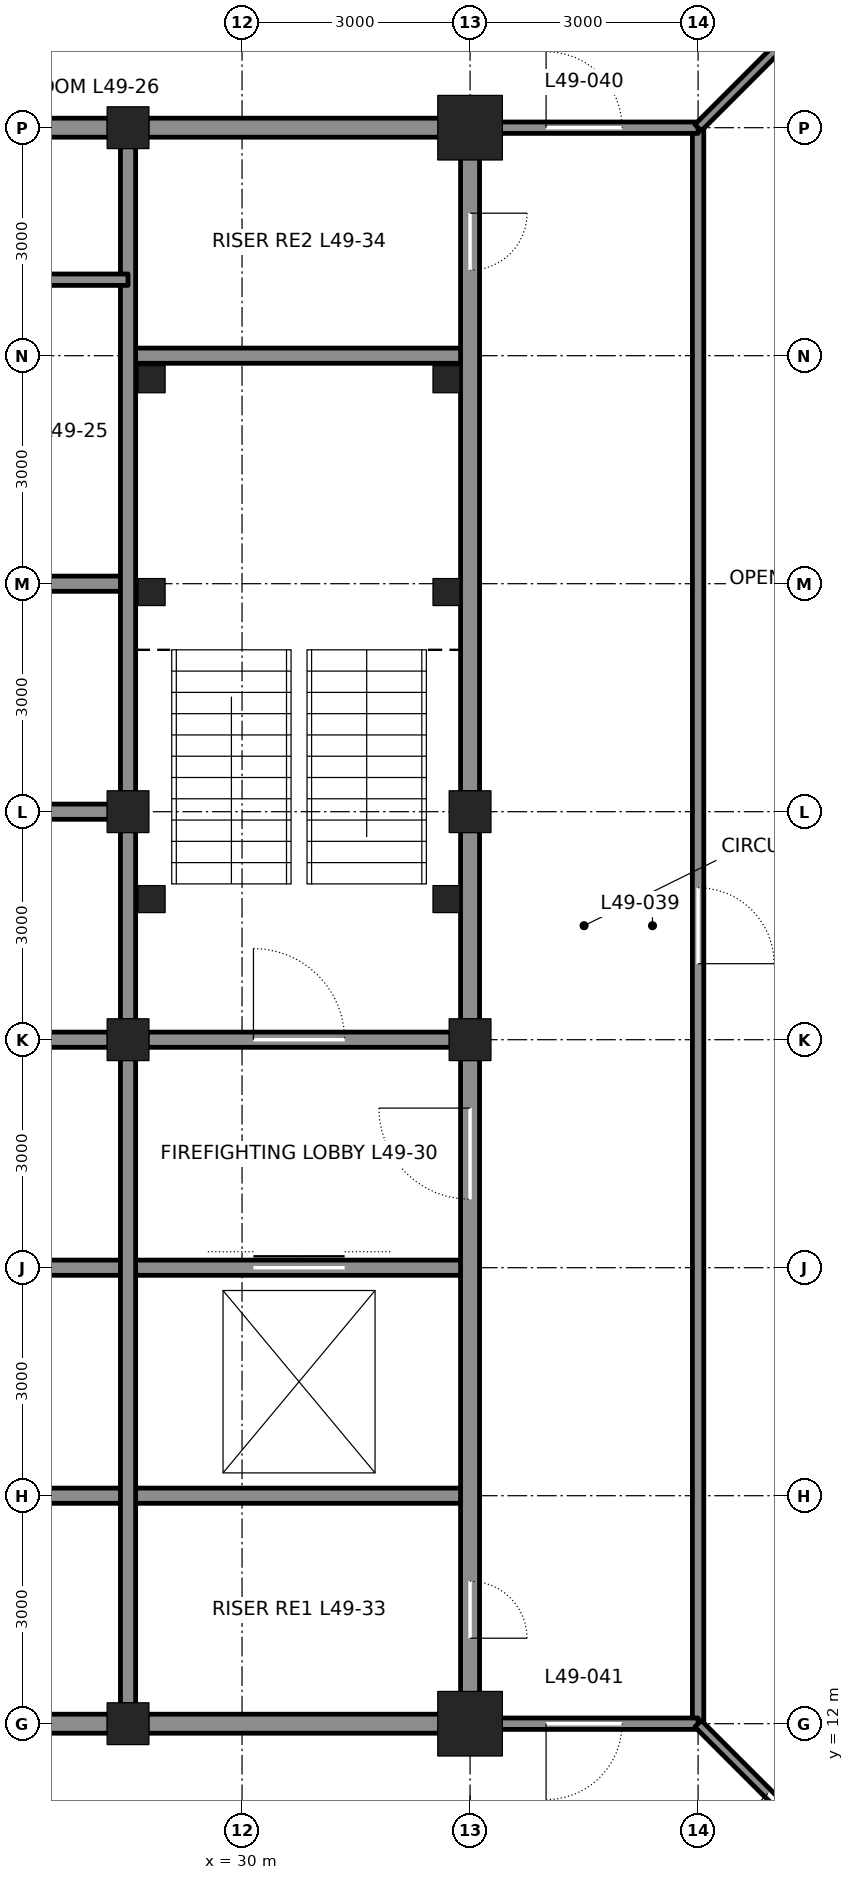
"""IFC4 building model, lengths in metres.
Left out: names, types, materials, properties, quantities, classifications, styles, units other than length and angle.
Written with IfcOpenShell. Run it as: python <this file> out.ifc"""

import sys

from ifc_helpers import new_model, si_unit, direction, frame, frame_2d, origin, origin_2d, place, context, subcontext, project, spatial, rectangle, hollow_rectangle, extrude, element, fill, save


model = new_model("IFC4")
c1 = context("Model", 3, precision=1e-05, world=origin(), true_north=direction((0.0, 1.0)))
c2 = subcontext(c1, "Body", "Model", "MODEL_VIEW")
j1 = project(units=[si_unit("LENGTHUNIT", "METRE"), si_unit("PLANEANGLEUNIT", "RADIAN")], contexts=[c1])
p1 = place(None, origin())
s1 = spatial("IfcSite", under=j1, at=p1, CompositionType="ELEMENT")
p2 = place(p1, origin())
s2 = spatial("IfcBuilding", under=s1, at=p2, CompositionType="ELEMENT")
p3 = place(p2, frame((0.0, 0.0, 222.3)))
s3 = spatial("IfcBuildingStorey", under=s2, at=p3, CompositionType="ELEMENT", Elevation=222.3)
p4 = place(p3, frame((28.5, 12.0, 0.0), z_axis=(0.0, 0.0, 1.0), x_axis=(1.0, 0.0, 0.0)))
e1 = element("IfcColumn", 1, at=p4, inside=s3, PredefinedType="COLUMN", context=c2, shape_type="SweptSolid", body=[
    extrude(hollow_rectangle(XDim=0.55, YDim=0.55, WallThickness=0.045, at=origin_2d()), origin(), (0.0, 0.0, 1.0), 4.2),
])
p5 = place(p3, frame((33.0, 12.0, 0.0), z_axis=(0.0, 0.0, 1.0), x_axis=(1.0, 0.0, 0.0)))
e2 = element("IfcColumn", 2, at=p5, inside=s3, PredefinedType="COLUMN", context=c2, shape_type="SweptSolid", body=[
    extrude(hollow_rectangle(XDim=0.85, YDim=0.85, WallThickness=0.085, at=origin_2d()), origin(), (0.0, 0.0, 1.0), 4.2),
])
p6 = place(p3, frame((28.5, 33.0, 0.0), z_axis=(0.0, 0.0, 1.0), x_axis=(1.0, 0.0, 0.0)))
e3 = element("IfcColumn", 3, at=p6, inside=s3, PredefinedType="COLUMN", context=c2, shape_type="SweptSolid", body=[
    extrude(hollow_rectangle(XDim=0.55, YDim=0.55, WallThickness=0.045, at=origin_2d()), origin(), (0.0, 0.0, 1.0), 4.2),
])
p7 = place(p3, frame((33.0, 33.0, 0.0), z_axis=(0.0, 0.0, 1.0), x_axis=(1.0, 0.0, 0.0)))
e4 = element("IfcColumn", 4, at=p7, inside=s3, PredefinedType="COLUMN", context=c2, shape_type="SweptSolid", body=[
    extrude(hollow_rectangle(XDim=0.85, YDim=0.85, WallThickness=0.085, at=origin_2d()), origin(), (0.0, 0.0, 1.0), 4.2),
])
for number, where, z_axis, x_axis in (
    (5, (33.0, 21.0, 0.0), (0.0, 0.0, 1.0), (1.0, 0.0, 0.0)),
    (6, (33.0, 24.0, 0.0), (0.0, 0.0, 1.0), (1.0, 0.0, 0.0)),
    (7, (28.5, 21.0, 0.0), (0.0, 0.0, 1.0), (1.0, 0.0, 0.0)),
    (8, (28.5, 24.0, 0.0), (0.0, 0.0, 1.0), (1.0, 0.0, 0.0)),
):
    element("IfcColumn", number, at=place(p3, frame(where, z_axis=z_axis, x_axis=x_axis)), inside=s3, PredefinedType="COLUMN", context=c2, shape_type="SweptSolid", body=[
        extrude(hollow_rectangle(XDim=0.55, YDim=0.55, WallThickness=0.045, at=origin_2d()), origin(), (0.0, 0.0, 1.0), 4.2),
    ])
p8 = place(p3, frame((25.75, 12.0, 0.0), z_axis=(0.0, 0.0, 1.0), x_axis=(1.0, 0.0, 0.0)))
e9 = element("IfcWall", 9, at=p8, inside=s3, PredefinedType="SOLIDWALL", context=c2, shape_type="SweptSolid", body=[
    extrude(rectangle(XDim=2.5, YDim=0.25, at=frame_2d((1.25, 0.0))), origin(), (0.0, 0.0, 1.0), 3.181),
])
p9 = place(p3, frame((28.75, 12.0, 0.0), z_axis=(0.0, 0.0, 1.0), x_axis=(1.0, 0.0, 0.0)))
e10 = element("IfcWall", 10, at=p9, inside=s3, PredefinedType="SOLIDWALL", context=c2, shape_type="SweptSolid", body=[
    extrude(rectangle(XDim=4.0, YDim=0.25, at=frame_2d((2.0, 0.0))), origin(), (0.0, 0.0, 1.0), 3.181),
])
p10 = place(p3, frame((25.5, 15.0, 0.0), z_axis=(0.0, 0.0, 1.0), x_axis=(1.0, 0.0, 0.0)))
e11 = element("IfcWall", 11, at=p10, inside=s3, PredefinedType="SOLIDWALL", context=c2, shape_type="SweptSolid", body=[
    extrude(rectangle(XDim=7.5, YDim=0.2, at=frame_2d((3.75, 0.0))), origin(), (0.0, 0.0, 1.0), 4.04),
])
p11 = place(p3, frame((25.5, 24.0, 0.0), z_axis=(0.0, 0.0, 1.0), x_axis=(1.0, 0.0, 0.0)))
e12 = element("IfcWall", 12, at=p11, inside=s3, PredefinedType="SOLIDWALL", context=c2, shape_type="SweptSolid", body=[
    extrude(rectangle(XDim=2.75, YDim=0.2, at=frame_2d((1.375, 0.0))), origin(), (0.0, 0.0, 1.0), 3.09),
])
p12 = place(p3, frame((25.5, 27.0, 0.0), z_axis=(0.0, 0.0, 1.0), x_axis=(1.0, 0.0, 0.0)))
e13 = element("IfcWall", 13, at=p12, inside=s3, PredefinedType="SOLIDWALL", context=c2, shape_type="SweptSolid", body=[
    extrude(rectangle(XDim=3.0, YDim=0.2, at=frame_2d((1.5, 0.0))), origin(), (0.0, 0.0, 1.0), 4.04),
])
p13 = place(p3, frame((28.5, 30.0, 0.0), z_axis=(0.0, 0.0, 1.0), x_axis=(1.0, 0.0, 0.0)))
e14 = element("IfcWall", 14, at=p13, inside=s3, PredefinedType="SOLIDWALL", context=c2, shape_type="SweptSolid", body=[
    extrude(rectangle(XDim=4.5, YDim=0.2, at=frame_2d((2.25, 0.0))), origin(), (0.0, 0.0, 1.0), 4.04),
])
p14 = place(p3, frame((25.75, 33.0, 0.0), z_axis=(0.0, 0.0, 1.0), x_axis=(1.0, 0.0, 0.0)))
e15 = element("IfcWall", 15, at=p14, inside=s3, PredefinedType="SOLIDWALL", context=c2, shape_type="SweptSolid", body=[
    extrude(rectangle(XDim=2.5, YDim=0.25, at=frame_2d((1.25, 0.0))), origin(), (0.0, 0.0, 1.0), 3.181),
])
p15 = place(p3, frame((28.75, 33.0, 0.0), z_axis=(0.0, 0.0, 1.0), x_axis=(1.0, 0.0, 0.0)))
e16 = element("IfcWall", 16, at=p15, inside=s3, PredefinedType="SOLIDWALL", context=c2, shape_type="SweptSolid", body=[
    extrude(rectangle(XDim=4.0, YDim=0.25, at=frame_2d((2.0, 0.0))), origin(), (0.0, 0.0, 1.0), 3.181),
])
p16 = place(p3, frame((25.5, 18.0, 0.0), z_axis=(0.0, 0.0, 1.0), x_axis=(1.0, 0.0, 0.0)))
e17 = element("IfcWall", 17, at=p16, inside=s3, PredefinedType="SOLIDWALL", context=c2, shape_type="SweptSolid", body=[
    extrude(rectangle(XDim=7.5, YDim=0.2, at=frame_2d((3.75, 0.0))), origin(), (0.0, 0.0, 1.0), 4.04),
])
p17 = place(p16, frame((4.65, 0.0, 0.0)))
e18 = element("IfcOpeningElement", 18, at=p17, cuts=e17, PredefinedType="OPENING", context=c2, shape_type="SweptSolid", body=[
    extrude(rectangle(XDim=1.2, YDim=2.1, at=frame_2d((0.6, 1.05))), frame((0.0, 0.11, 0.0), z_axis=(0.0, -1.0, 0.0), x_axis=(1.0, 0.0, 0.0)), (0.0, 0.0, 1.0), 0.22),
])
p18 = place(p3, frame((25.5, 21.0, 0.0), z_axis=(0.0, 0.0, 1.0), x_axis=(1.0, 0.0, 0.0)))
e19 = element("IfcWall", 19, at=p18, inside=s3, PredefinedType="SOLIDWALL", context=c2, shape_type="SweptSolid", body=[
    extrude(rectangle(XDim=2.75, YDim=0.2, at=frame_2d((1.375, 0.0))), origin(), (0.0, 0.0, 1.0), 3.09),
])
p19 = place(p3, frame((28.75, 21.0, 0.0), z_axis=(0.0, 0.0, 1.0), x_axis=(1.0, 0.0, 0.0)))
e20 = element("IfcWall", 20, at=p19, inside=s3, PredefinedType="SOLIDWALL", context=c2, shape_type="SweptSolid", body=[
    extrude(rectangle(XDim=4.0, YDim=0.2, at=frame_2d((2.0, 0.0))), origin(), (0.0, 0.0, 1.0), 3.09),
])
p20 = place(p19, frame((1.4, 0.0, 0.0)))
e21 = element("IfcOpeningElement", 21, at=p20, cuts=e20, PredefinedType="OPENING", context=c2, shape_type="SweptSolid", body=[
    extrude(rectangle(XDim=1.2, YDim=2.1, at=frame_2d((0.6, 1.05))), frame((0.0, 0.11, 0.0), z_axis=(0.0, -1.0, 0.0), x_axis=(1.0, 0.0, 0.0)), (0.0, 0.0, 1.0), 0.22),
])
p21 = place(p3, frame((28.5, 12.25, 0.0), z_axis=(0.0, 0.0, 1.0), x_axis=(0.0, 1.0, 0.0)))
e22 = element("IfcWall", 22, at=p21, inside=s3, PredefinedType="SOLIDWALL", context=c2, shape_type="SweptSolid", body=[
    extrude(rectangle(XDim=8.5, YDim=0.2, at=frame_2d((4.25, 0.0))), origin(), (0.0, 0.0, 1.0), 3.113),
])
p22 = place(p3, frame((28.5, 21.25, 0.0), z_axis=(0.0, 0.0, 1.0), x_axis=(0.0, 1.0, 0.0)))
e23 = element("IfcWall", 23, at=p22, inside=s3, PredefinedType="SOLIDWALL", context=c2, shape_type="SweptSolid", body=[
    extrude(rectangle(XDim=2.5, YDim=0.2, at=frame_2d((1.25, 0.0))), origin(), (0.0, 0.0, 1.0), 3.113),
])
p23 = place(p3, frame((28.5, 24.25, 0.0), z_axis=(0.0, 0.0, 1.0), x_axis=(0.0, 1.0, 0.0)))
e24 = element("IfcWall", 24, at=p23, inside=s3, PredefinedType="SOLIDWALL", context=c2, shape_type="SweptSolid", body=[
    extrude(rectangle(XDim=8.5, YDim=0.2, at=frame_2d((4.25, 0.0))), origin(), (0.0, 0.0, 1.0), 3.113),
])
p24 = place(p3, frame((33.0, 12.25, 0.0), z_axis=(0.0, 0.0, 1.0), x_axis=(0.0, 1.0, 0.0)))
e25 = element("IfcWall", 25, at=p24, inside=s3, PredefinedType="SOLIDWALL", context=c2, shape_type="SweptSolid", body=[
    extrude(rectangle(XDim=8.5, YDim=0.25, at=frame_2d((4.25, 0.0))), origin(), (0.0, 0.0, 1.0), 3.113),
])
p25 = place(p24, frame((6.65, 0.0, 0.0)))
e26 = element("IfcOpeningElement", 26, at=p25, cuts=e25, PredefinedType="OPENING", context=c2, shape_type="SweptSolid", body=[
    extrude(rectangle(XDim=1.2, YDim=2.1, at=frame_2d((0.6, 1.05))), frame((0.0, 0.135, 0.0), z_axis=(0.0, -1.0, 0.0), x_axis=(1.0, 0.0, 0.0)), (0.0, 0.0, 1.0), 0.27),
])
p26 = place(p24, frame((0.875, 0.0, 0.0)))
e27 = element("IfcOpeningElement", 27, at=p26, cuts=e25, PredefinedType="OPENING", context=c2, shape_type="SweptSolid", body=[
    extrude(rectangle(XDim=0.75, YDim=2.1, at=frame_2d((0.375, 1.05))), frame((0.0, 0.135, 0.0), z_axis=(0.0, -1.0, 0.0), x_axis=(1.0, 0.0, 0.0)), (0.0, 0.0, 1.0), 0.27),
])
p27 = place(p3, frame((33.0, 21.25, 0.0), z_axis=(0.0, 0.0, 1.0), x_axis=(0.0, 1.0, 0.0)))
e28 = element("IfcWall", 28, at=p27, inside=s3, PredefinedType="SOLIDWALL", context=c2, shape_type="SweptSolid", body=[
    extrude(rectangle(XDim=2.5, YDim=0.25, at=frame_2d((1.25, 0.0))), origin(), (0.0, 0.0, 1.0), 3.113),
])
p28 = place(p3, frame((33.0, 24.25, 0.0), z_axis=(0.0, 0.0, 1.0), x_axis=(0.0, 1.0, 0.0)))
e29 = element("IfcWall", 29, at=p28, inside=s3, PredefinedType="SOLIDWALL", context=c2, shape_type="SweptSolid", body=[
    extrude(rectangle(XDim=8.5, YDim=0.25, at=frame_2d((4.25, 0.0))), origin(), (0.0, 0.0, 1.0), 3.113),
])
p29 = place(p28, frame((6.875, 0.0, 0.0)))
e30 = element("IfcOpeningElement", 30, at=p29, cuts=e29, PredefinedType="OPENING", context=c2, shape_type="SweptSolid", body=[
    extrude(rectangle(XDim=0.75, YDim=2.1, at=frame_2d((0.375, 1.05))), frame((0.0, 0.135, 0.0), z_axis=(0.0, -1.0, 0.0), x_axis=(1.0, 0.0, 0.0)), (0.0, 0.0, 1.0), 0.27),
])
p30 = place(p3, frame((25.5, 31.0, 0.0), z_axis=(0.0, 0.0, 1.0), x_axis=(1.0, 0.0, 0.0)))
e31 = element("IfcWall", 31, at=p30, inside=s3, PredefinedType="PARTITIONING", context=c2, shape_type="SweptSolid", body=[
    extrude(rectangle(XDim=3.0, YDim=0.15, at=frame_2d((1.5, 0.0))), origin(), (0.0, 0.0, 1.0), 4.04),
])
p31 = place(p3, frame((36.0, 12.0, 0.0), z_axis=(0.0, 0.0, 1.0), x_axis=(0.0, 1.0, 0.0)))
e32 = element("IfcWall", 32, at=p31, inside=s3, PredefinedType="PARTITIONING", context=c2, shape_type="SweptSolid", body=[
    extrude(rectangle(XDim=21.0, YDim=0.15, at=frame_2d((10.5, 0.0))), origin(), (0.0, 0.0, 1.0), 4.04),
])
p32 = place(p31, frame((10.0, 0.0, 0.0)))
e33 = element("IfcOpeningElement", 33, at=p32, cuts=e32, PredefinedType="OPENING", context=c2, shape_type="SweptSolid", body=[
    extrude(rectangle(XDim=1.0, YDim=2.4, at=frame_2d((0.5, 1.2))), frame((0.0, 0.085, 0.0), z_axis=(0.0, -1.0, 0.0), x_axis=(1.0, 0.0, 0.0)), (0.0, 0.0, 1.0), 0.17),
])
p33 = place(p3, frame((33.0, 33.0, 0.0), z_axis=(0.0, 0.0, 1.0), x_axis=(1.0, 0.0, 0.0)))
e34 = element("IfcWall", 34, at=p33, inside=s3, PredefinedType="PARTITIONING", context=c2, shape_type="SweptSolid", body=[
    extrude(rectangle(XDim=3.0, YDim=0.15, at=frame_2d((1.5, 0.0))), origin(), (0.0, 0.0, 1.0), 3.27),
])
p34 = place(p33, frame((1.0, 0.0, 0.0)))
e35 = element("IfcOpeningElement", 35, at=p34, cuts=e34, PredefinedType="OPENING", context=c2, shape_type="SweptSolid", body=[
    extrude(rectangle(XDim=1.0, YDim=2.4, at=frame_2d((0.5, 1.2))), frame((0.0, 0.085, 0.0), z_axis=(0.0, -1.0, 0.0), x_axis=(1.0, 0.0, 0.0)), (0.0, 0.0, 1.0), 0.17),
])
p35 = place(p3, frame((33.0, 12.0, 0.0), z_axis=(0.0, 0.0, 1.0), x_axis=(1.0, 0.0, 0.0)))
e36 = element("IfcWall", 36, at=p35, inside=s3, PredefinedType="PARTITIONING", context=c2, shape_type="SweptSolid", body=[
    extrude(rectangle(XDim=3.0, YDim=0.15, at=frame_2d((1.5, 0.0))), origin(), (0.0, 0.0, 1.0), 3.27),
])
p36 = place(p35, frame((1.0, 0.0, 0.0)))
e37 = element("IfcOpeningElement", 37, at=p36, cuts=e36, PredefinedType="OPENING", context=c2, shape_type="SweptSolid", body=[
    extrude(rectangle(XDim=1.0, YDim=2.4, at=frame_2d((0.5, 1.2))), frame((0.0, 0.085, 0.0), z_axis=(0.0, -1.0, 0.0), x_axis=(1.0, 0.0, 0.0)), (0.0, 0.0, 1.0), 0.17),
])
p37 = place(p3, frame((36.0, 33.0, 0.0), z_axis=(0.0, 0.0, 1.0), x_axis=(0.707106781187, 0.707106781187, 0.0)))
e38 = element("IfcWall", 38, at=p37, inside=s3, PredefinedType="PARTITIONING", context=c2, shape_type="SweptSolid", body=[
    extrude(rectangle(XDim=1.489, YDim=0.12, at=frame_2d((0.745, 0.0))), origin(), (0.0, 0.0, 1.0), 4.04),
])
p38 = place(p3, frame((36.0, 12.0, 0.0), z_axis=(0.0, 0.0, 1.0), x_axis=(0.707106781187, -0.707106781187, 0.0)))
e39 = element("IfcWall", 39, at=p38, inside=s3, PredefinedType="PARTITIONING", context=c2, shape_type="SweptSolid", body=[
    extrude(rectangle(XDim=5.732, YDim=0.12, at=frame_2d((2.866, 0.0))), origin(), (0.0, 0.0, 1.0), 4.04),
])
p39 = place(p38, frame((1.3, 0.0, 0.0)))
e40 = element("IfcOpeningElement", 40, at=p39, cuts=e39, PredefinedType="OPENING", context=c2, shape_type="SweptSolid", body=[
    extrude(rectangle(XDim=1.0, YDim=2.4, at=frame_2d((0.5, 1.2))), frame((0.0, 0.07, 0.0), z_axis=(0.0, -1.0, 0.0), x_axis=(1.0, 0.0, 0.0)), (0.0, 0.0, 1.0), 0.14),
])
for number, where, z_axis, x_axis in (
    (41, (28.81, 29.69, 0.0), (0.0, 0.0, 1.0), (1.0, 0.0, 0.0)),
    (42, (32.69, 29.69, 0.0), (0.0, 0.0, 1.0), (1.0, 0.0, 0.0)),
    (43, (28.81, 26.89, 0.0), (0.0, 0.0, 1.0), (1.0, 0.0, 0.0)),
    (44, (32.69, 26.89, 0.0), (0.0, 0.0, 1.0), (1.0, 0.0, 0.0)),
    (45, (28.81, 22.85, 0.0), (0.0, 0.0, 1.0), (1.0, 0.0, 0.0)),
    (46, (32.69, 22.85, 0.0), (0.0, 0.0, 1.0), (1.0, 0.0, 0.0)),
):
    element("IfcColumn", number, at=place(p3, frame(where, z_axis=z_axis, x_axis=x_axis)), inside=s3, PredefinedType="COLUMN", context=c2, shape_type="SweptSolid", body=[
        extrude(hollow_rectangle(XDim=0.356, YDim=0.356, WallThickness=0.009, at=origin_2d()), origin(), (0.0, 0.0, 1.0), 4.2),
    ])
p40 = place(p20, origin())
e47 = element("IfcDoor", 47, at=p40, inside=s3, OperationType="SINGLE_SWING_LEFT", PredefinedType="DOOR", context=c2, shape_type="SweptSolid", body=[
    extrude(rectangle(XDim=1.2, YDim=2.1, at=frame_2d((0.6, 1.05))), frame((0.0, 0.025, 0.0), z_axis=(0.0, -1.0, 0.0), x_axis=(1.0, 0.0, 0.0)), (0.0, 0.0, 1.0), 0.05),
])
fill(e21, e47)
p41 = place(p25, origin())
e48 = element("IfcDoor", 48, at=p41, inside=s3, OperationType="SINGLE_SWING_RIGHT", PredefinedType="DOOR", context=c2, shape_type="SweptSolid", body=[
    extrude(rectangle(XDim=1.2, YDim=2.1, at=frame_2d((0.6, 1.05))), frame((0.0, 0.025, 0.0), z_axis=(0.0, -1.0, 0.0), x_axis=(1.0, 0.0, 0.0)), (0.0, 0.0, 1.0), 0.05),
])
fill(e26, e48)
p42 = place(p17, origin())
e49 = element("IfcDoor", 49, at=p42, inside=s3, OperationType="DOUBLE_DOOR_SLIDING", PredefinedType="DOOR", context=c2, shape_type="SweptSolid", body=[
    extrude(rectangle(XDim=1.2, YDim=2.1, at=frame_2d((0.6, 1.05))), frame((0.0, 0.025, 0.0), z_axis=(0.0, -1.0, 0.0), x_axis=(1.0, 0.0, 0.0)), (0.0, 0.0, 1.0), 0.05),
])
fill(e18, e49)
p43 = place(p26, frame((0.75, 0.0, 0.0), z_axis=(0.0, 0.0, 1.0), x_axis=(-1.0, 0.0, 0.0)))
e50 = element("IfcDoor", 50, at=p43, inside=s3, OperationType="SINGLE_SWING_RIGHT", PredefinedType="DOOR", context=c2, shape_type="SweptSolid", body=[
    extrude(rectangle(XDim=0.75, YDim=2.1, at=frame_2d((0.375, 1.05))), frame((0.0, 0.025, 0.0), z_axis=(0.0, -1.0, 0.0), x_axis=(1.0, 0.0, 0.0)), (0.0, 0.0, 1.0), 0.05),
])
fill(e27, e50)
p44 = place(p29, frame((0.75, 0.0, 0.0), z_axis=(0.0, 0.0, 1.0), x_axis=(-1.0, 0.0, 0.0)))
e51 = element("IfcDoor", 51, at=p44, inside=s3, OperationType="SINGLE_SWING_LEFT", PredefinedType="DOOR", context=c2, shape_type="SweptSolid", body=[
    extrude(rectangle(XDim=0.75, YDim=2.1, at=frame_2d((0.375, 1.05))), frame((0.0, 0.025, 0.0), z_axis=(0.0, -1.0, 0.0), x_axis=(1.0, 0.0, 0.0)), (0.0, 0.0, 1.0), 0.05),
])
fill(e30, e51)
p45 = place(p32, frame((1.0, 0.0, 0.0), z_axis=(0.0, 0.0, 1.0), x_axis=(-1.0, 0.0, 0.0)))
e52 = element("IfcDoor", 52, at=p45, inside=s3, OperationType="SINGLE_SWING_RIGHT", PredefinedType="DOOR", context=c2, shape_type="SweptSolid", body=[
    extrude(rectangle(XDim=1.0, YDim=2.4, at=frame_2d((0.5, 1.2))), frame((0.0, 0.025, 0.0), z_axis=(0.0, -1.0, 0.0), x_axis=(1.0, 0.0, 0.0)), (0.0, 0.0, 1.0), 0.05),
])
fill(e33, e52)
p46 = place(p34, origin())
e53 = element("IfcDoor", 53, at=p46, inside=s3, OperationType="SINGLE_SWING_LEFT", PredefinedType="DOOR", context=c2, shape_type="SweptSolid", body=[
    extrude(rectangle(XDim=1.0, YDim=2.4, at=frame_2d((0.5, 1.2))), frame((0.0, 0.025, 0.0), z_axis=(0.0, -1.0, 0.0), x_axis=(1.0, 0.0, 0.0)), (0.0, 0.0, 1.0), 0.05),
])
fill(e35, e53)
p47 = place(p36, frame((1.0, 0.0, 0.0), z_axis=(0.0, 0.0, 1.0), x_axis=(-1.0, 0.0, 0.0)))
e54 = element("IfcDoor", 54, at=p47, inside=s3, OperationType="SINGLE_SWING_RIGHT", PredefinedType="DOOR", context=c2, shape_type="SweptSolid", body=[
    extrude(rectangle(XDim=1.0, YDim=2.4, at=frame_2d((0.5, 1.2))), frame((0.0, 0.025, 0.0), z_axis=(0.0, -1.0, 0.0), x_axis=(1.0, 0.0, 0.0)), (0.0, 0.0, 1.0), 0.05),
])
fill(e37, e54)
p48 = place(p39, frame((1.0, 0.0, 0.0), z_axis=(0.0, 0.0, 1.0), x_axis=(-1.0, 0.0, 0.0)))
e55 = element("IfcDoor", 55, at=p48, inside=s3, OperationType="SINGLE_SWING_RIGHT", PredefinedType="DOOR", context=c2, shape_type="SweptSolid", body=[
    extrude(rectangle(XDim=1.0, YDim=2.4, at=frame_2d((0.5, 1.2))), frame((0.0, 0.025, 0.0), z_axis=(0.0, -1.0, 0.0), x_axis=(1.0, 0.0, 0.0)), (0.0, 0.0, 1.0), 0.05),
])
fill(e40, e55)
save(model, sys.argv[1])
